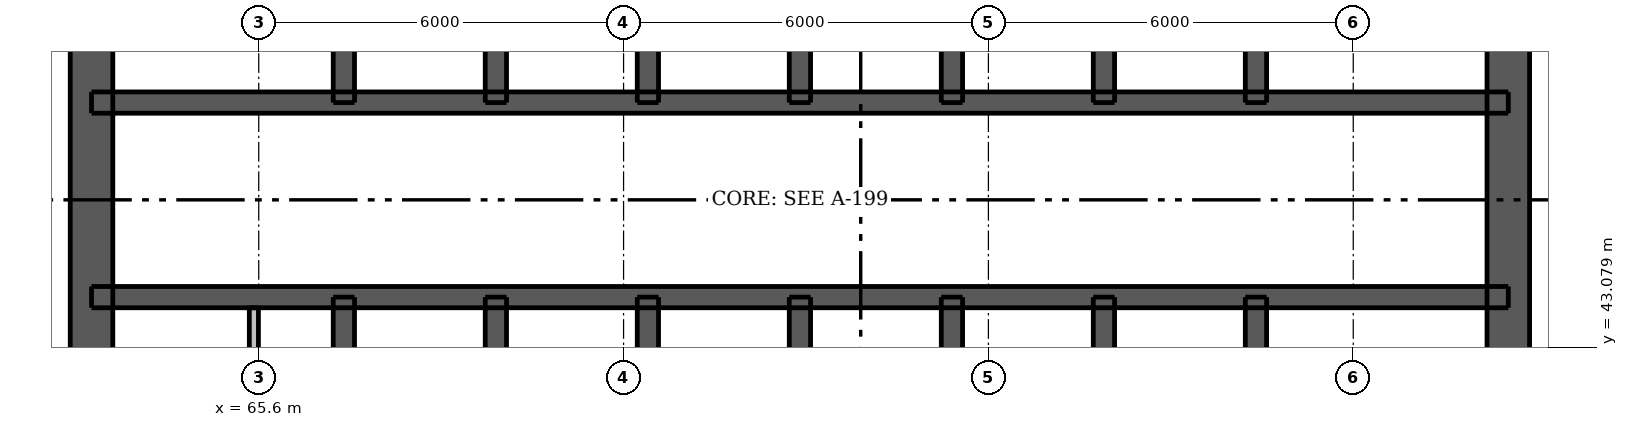
"""IFC4 building model, lengths in metres.
Left out: names, types, materials, properties, quantities, classifications, styles, units other than length and angle.
Written with IfcOpenShell. Run it as: python <this file> out.ifc"""

import sys

from ifc_helpers import new_model, si_unit, direction, frame, frame_2d, origin, place, context, subcontext, project, spatial, rectangle, extrude, element, fill, save


model = new_model("IFC4")
c1 = context("Model", 3, precision=1e-05, world=origin(), true_north=direction((0.0, 1.0)))
c2 = subcontext(c1, "Body", "Model", "MODEL_VIEW")
j1 = project(units=[si_unit("LENGTHUNIT", "METRE"), si_unit("PLANEANGLEUNIT", "RADIAN")], contexts=[c1])
p1 = place(None, origin())
s1 = spatial("IfcSite", under=j1, at=p1, CompositionType="ELEMENT")
p2 = place(p1, origin())
s2 = spatial("IfcBuilding", under=s1, at=p2, CompositionType="ELEMENT")
p3 = place(p2, frame((0.0, 0.0, 133.9)))
s3 = spatial("IfcBuildingStorey", under=s2, at=p3, CompositionType="ELEMENT", Elevation=133.9)
p4 = place(p3, frame((62.85, 33.5, 0.0), z_axis=(0.0, 0.0, 1.0), x_axis=(0.0, 1.0, 0.0)))
e1 = element("IfcWall", 1, at=p4, inside=s3, PredefinedType="SHEAR", context=c2, shape_type="SweptSolid", body=[
    extrude(rectangle(XDim=24.0, YDim=0.7, at=frame_2d((12.0, 0.0))), origin(), (0.0, 0.0, 1.0), 3.05),
])
p5 = place(p4, frame((11.2, 0.0, 0.0)))
e2 = element("IfcOpeningElement", 2, at=p5, cuts=e1, PredefinedType="OPENING", context=c2, shape_type="SweptSolid", body=[
    extrude(rectangle(XDim=1.6, YDim=2.1, at=frame_2d((0.8, 1.05))), frame((0.0, 0.36, 0.0), z_axis=(0.0, -1.0, 0.0), x_axis=(1.0, 0.0, 0.0)), (0.0, 0.0, 1.0), 0.72),
])
p6 = place(p3, frame((86.15, 33.5, 0.0), z_axis=(0.0, 0.0, 1.0), x_axis=(0.0, 1.0, 0.0)))
e3 = element("IfcWall", 3, at=p6, inside=s3, PredefinedType="SHEAR", context=c2, shape_type="SweptSolid", body=[
    extrude(rectangle(XDim=24.0, YDim=0.7, at=frame_2d((12.0, 0.0))), origin(), (0.0, 0.0, 1.0), 3.05),
])
p7 = place(p6, frame((11.2, 0.0, 0.0)))
e4 = element("IfcOpeningElement", 4, at=p7, cuts=e3, PredefinedType="OPENING", context=c2, shape_type="SweptSolid", body=[
    extrude(rectangle(XDim=1.6, YDim=2.1, at=frame_2d((0.8, 1.05))), frame((0.0, 0.36, 0.0), z_axis=(0.0, -1.0, 0.0), x_axis=(1.0, 0.0, 0.0)), (0.0, 0.0, 1.0), 0.72),
])
p8 = place(p3, frame((62.85, 43.9, 0.0), z_axis=(0.0, 0.0, 1.0), x_axis=(1.0, 0.0, 0.0)))
e5 = element("IfcWall", 5, at=p8, inside=s3, PredefinedType="SHEAR", context=c2, shape_type="SweptSolid", body=[
    extrude(rectangle(XDim=23.3, YDim=0.35, at=frame_2d((11.65, 0.0))), origin(), (0.0, 0.0, 1.0), 3.05),
])
p9 = place(p8, frame((1.06, 0.0, 0.0)))
e6 = element("IfcOpeningElement", 6, at=p9, cuts=e5, PredefinedType="OPENING", context=c2, shape_type="SweptSolid", body=[
    extrude(rectangle(XDim=0.9, YDim=2.1, at=frame_2d((0.45, 1.05))), frame((0.0, 0.185, 0.0), z_axis=(0.0, -1.0, 0.0), x_axis=(1.0, 0.0, 0.0)), (0.0, 0.0, 1.0), 0.37),
])
p10 = place(p8, frame((2.923, 0.0, 0.0)))
e7 = element("IfcOpeningElement", 7, at=p10, cuts=e5, PredefinedType="OPENING", context=c2, shape_type="SweptSolid", body=[
    extrude(rectangle(XDim=0.8, YDim=2.1, at=frame_2d((0.4, 1.05))), frame((0.0, 0.185, 0.0), z_axis=(0.0, -1.0, 0.0), x_axis=(1.0, 0.0, 0.0)), (0.0, 0.0, 1.0), 0.37),
])
p11 = place(p8, frame((20.688, 0.0, 0.0)))
e8 = element("IfcOpeningElement", 8, at=p11, cuts=e5, PredefinedType="OPENING", context=c2, shape_type="SweptSolid", body=[
    extrude(rectangle(XDim=0.9, YDim=2.1, at=frame_2d((0.45, 1.05))), frame((0.0, 0.185, 0.0), z_axis=(0.0, -1.0, 0.0), x_axis=(1.0, 0.0, 0.0)), (0.0, 0.0, 1.0), 0.37),
])
p12 = place(p8, frame((4.85, 0.0, 0.0)))
e9 = element("IfcOpeningElement", 9, at=p12, cuts=e5, PredefinedType="OPENING", context=c2, shape_type="SweptSolid", body=[
    extrude(rectangle(XDim=1.1, YDim=2.1, at=frame_2d((0.55, 1.05))), frame((0.0, 0.185, 0.0), z_axis=(0.0, -1.0, 0.0), x_axis=(1.0, 0.0, 0.0)), (0.0, 0.0, 1.0), 0.37),
])
p13 = place(p8, frame((7.35, 0.0, 0.0)))
e10 = element("IfcOpeningElement", 10, at=p13, cuts=e5, PredefinedType="OPENING", context=c2, shape_type="SweptSolid", body=[
    extrude(rectangle(XDim=1.1, YDim=2.1, at=frame_2d((0.55, 1.05))), frame((0.0, 0.185, 0.0), z_axis=(0.0, -1.0, 0.0), x_axis=(1.0, 0.0, 0.0)), (0.0, 0.0, 1.0), 0.37),
])
p14 = place(p8, frame((9.85, 0.0, 0.0)))
e11 = element("IfcOpeningElement", 11, at=p14, cuts=e5, PredefinedType="OPENING", context=c2, shape_type="SweptSolid", body=[
    extrude(rectangle(XDim=1.1, YDim=2.1, at=frame_2d((0.55, 1.05))), frame((0.0, 0.185, 0.0), z_axis=(0.0, -1.0, 0.0), x_axis=(1.0, 0.0, 0.0)), (0.0, 0.0, 1.0), 0.37),
])
p15 = place(p8, frame((12.35, 0.0, 0.0)))
e12 = element("IfcOpeningElement", 12, at=p15, cuts=e5, PredefinedType="OPENING", context=c2, shape_type="SweptSolid", body=[
    extrude(rectangle(XDim=1.1, YDim=2.1, at=frame_2d((0.55, 1.05))), frame((0.0, 0.185, 0.0), z_axis=(0.0, -1.0, 0.0), x_axis=(1.0, 0.0, 0.0)), (0.0, 0.0, 1.0), 0.37),
])
p16 = place(p8, frame((14.85, 0.0, 0.0)))
e13 = element("IfcOpeningElement", 13, at=p16, cuts=e5, PredefinedType="OPENING", context=c2, shape_type="SweptSolid", body=[
    extrude(rectangle(XDim=1.1, YDim=2.1, at=frame_2d((0.55, 1.05))), frame((0.0, 0.185, 0.0), z_axis=(0.0, -1.0, 0.0), x_axis=(1.0, 0.0, 0.0)), (0.0, 0.0, 1.0), 0.37),
])
p17 = place(p8, frame((17.35, 0.0, 0.0)))
e14 = element("IfcOpeningElement", 14, at=p17, cuts=e5, PredefinedType="OPENING", context=c2, shape_type="SweptSolid", body=[
    extrude(rectangle(XDim=1.1, YDim=2.1, at=frame_2d((0.55, 1.05))), frame((0.0, 0.185, 0.0), z_axis=(0.0, -1.0, 0.0), x_axis=(1.0, 0.0, 0.0)), (0.0, 0.0, 1.0), 0.37),
])
p18 = place(p3, frame((62.85, 47.1, 0.0), z_axis=(0.0, 0.0, 1.0), x_axis=(1.0, 0.0, 0.0)))
e15 = element("IfcWall", 15, at=p18, inside=s3, PredefinedType="SHEAR", context=c2, shape_type="SweptSolid", body=[
    extrude(rectangle(XDim=23.3, YDim=0.35, at=frame_2d((11.65, 0.0))), origin(), (0.0, 0.0, 1.0), 3.05),
])
p19 = place(p18, frame((1.712, 0.0, 0.0)))
e16 = element("IfcOpeningElement", 16, at=p19, cuts=e15, PredefinedType="OPENING", context=c2, shape_type="SweptSolid", body=[
    extrude(rectangle(XDim=0.9, YDim=2.1, at=frame_2d((0.45, 1.05))), frame((0.0, 0.185, 0.0), z_axis=(0.0, -1.0, 0.0), x_axis=(1.0, 0.0, 0.0)), (0.0, 0.0, 1.0), 0.37),
])
p20 = place(p18, frame((20.688, 0.0, 0.0)))
e17 = element("IfcOpeningElement", 17, at=p20, cuts=e15, PredefinedType="OPENING", context=c2, shape_type="SweptSolid", body=[
    extrude(rectangle(XDim=0.9, YDim=2.1, at=frame_2d((0.45, 1.05))), frame((0.0, 0.185, 0.0), z_axis=(0.0, -1.0, 0.0), x_axis=(1.0, 0.0, 0.0)), (0.0, 0.0, 1.0), 0.37),
])
p21 = place(p3, frame((67.0, 33.85, 0.0), z_axis=(0.0, 0.0, 1.0), x_axis=(0.0, 1.0, 0.0)))
e18 = element("IfcWall", 18, at=p21, inside=s3, PredefinedType="SHEAR", context=c2, shape_type="SweptSolid", body=[
    extrude(rectangle(XDim=10.05, YDim=0.35, at=frame_2d((5.025, 0.0))), origin(), (0.0, 0.0, 1.0), 3.05),
])
p22 = place(p21, frame((0.55, 0.0, 0.0)))
e19 = element("IfcOpeningElement", 19, at=p22, cuts=e18, PredefinedType="OPENING", context=c2, shape_type="SweptSolid", body=[
    extrude(rectangle(XDim=1.1, YDim=2.1, at=frame_2d((0.55, 1.05))), frame((0.0, 0.185, 0.0), z_axis=(0.0, -1.0, 0.0), x_axis=(1.0, 0.0, 0.0)), (0.0, 0.0, 1.0), 0.37),
])
for number, where, z_axis, x_axis in (
    (20, (67.0, 47.1, 0.0), (0.0, 0.0, 1.0), (0.0, 1.0, 0.0)),
    (21, (82.0, 33.85, 0.0), (0.0, 0.0, 1.0), (0.0, 1.0, 0.0)),
    (22, (82.0, 47.1, 0.0), (0.0, 0.0, 1.0), (0.0, 1.0, 0.0)),
):
    element("IfcWall", number, at=place(p3, frame(where, z_axis=z_axis, x_axis=x_axis)), inside=s3, PredefinedType="SHEAR", context=c2, shape_type="SweptSolid", body=[
        extrude(rectangle(XDim=10.05, YDim=0.35, at=frame_2d((5.025, 0.0))), origin(), (0.0, 0.0, 1.0), 3.05),
    ])
for number, where, z_axis, x_axis in (
    (23, (69.5, 41.0, 0.0), (0.0, 0.0, 1.0), (0.0, 1.0, 0.0)),
    (24, (69.5, 47.1, 0.0), (0.0, 0.0, 1.0), (0.0, 1.0, 0.0)),
    (25, (72.0, 41.0, 0.0), (0.0, 0.0, 1.0), (0.0, 1.0, 0.0)),
    (26, (72.0, 47.1, 0.0), (0.0, 0.0, 1.0), (0.0, 1.0, 0.0)),
    (27, (74.5, 41.0, 0.0), (0.0, 0.0, 1.0), (0.0, 1.0, 0.0)),
    (28, (74.5, 47.1, 0.0), (0.0, 0.0, 1.0), (0.0, 1.0, 0.0)),
    (29, (77.0, 41.0, 0.0), (0.0, 0.0, 1.0), (0.0, 1.0, 0.0)),
    (30, (77.0, 47.1, 0.0), (0.0, 0.0, 1.0), (0.0, 1.0, 0.0)),
    (31, (79.5, 41.0, 0.0), (0.0, 0.0, 1.0), (0.0, 1.0, 0.0)),
    (32, (79.5, 47.1, 0.0), (0.0, 0.0, 1.0), (0.0, 1.0, 0.0)),
):
    element("IfcWall", number, at=place(p3, frame(where, z_axis=z_axis, x_axis=x_axis)), inside=s3, PredefinedType="SHEAR", context=c2, shape_type="SweptSolid", body=[
        extrude(rectangle(XDim=2.9, YDim=0.35, at=frame_2d((1.45, 0.0))), origin(), (0.0, 0.0, 1.0), 3.05),
    ])
p23 = place(p3, frame((65.52, 41.175, 0.0), z_axis=(0.0, 0.0, 1.0), x_axis=(0.0, 1.0, 0.0)))
e33 = element("IfcWall", 33, at=p23, inside=s3, PredefinedType="PLUMBINGWALL", context=c2, shape_type="SweptSolid", body=[
    extrude(rectangle(XDim=2.55, YDim=0.15, at=frame_2d((1.275, 0.0))), origin(), (0.0, 0.0, 1.0), 3.05),
])
p24 = place(p5, origin())
e34 = element("IfcDoor", 34, at=p24, inside=s3, OperationType="DOUBLE_DOOR_SINGLE_SWING", PredefinedType="DOOR", context=c2, shape_type="SweptSolid", body=[
    extrude(rectangle(XDim=1.6, YDim=2.1, at=frame_2d((0.8, 1.05))), frame((0.0, -0.288, 0.0), z_axis=(0.0, -1.0, 0.0), x_axis=(1.0, 0.0, 0.0)), (0.0, 0.0, 1.0), 0.05),
])
fill(e2, e34)
p25 = place(p7, origin())
e35 = element("IfcDoor", 35, at=p25, inside=s3, OperationType="DOUBLE_DOOR_SINGLE_SWING", PredefinedType="DOOR", context=c2, shape_type="SweptSolid", body=[
    extrude(rectangle(XDim=1.6, YDim=2.1, at=frame_2d((0.8, 1.05))), frame((0.0, 0.337, 0.0), z_axis=(0.0, -1.0, 0.0), x_axis=(1.0, 0.0, 0.0)), (0.0, 0.0, 1.0), 0.05),
])
fill(e4, e35)
p26 = place(p9, origin())
e36 = element("IfcDoor", 36, at=p26, inside=s3, OperationType="SINGLE_SWING_LEFT", PredefinedType="DOOR", context=c2, shape_type="SweptSolid", body=[
    extrude(rectangle(XDim=0.9, YDim=2.1, at=frame_2d((0.45, 1.05))), frame((0.0, -0.112, 0.0), z_axis=(0.0, -1.0, 0.0), x_axis=(1.0, 0.0, 0.0)), (0.0, 0.0, 1.0), 0.05),
])
fill(e6, e36)
p27 = place(p10, origin())
e37 = element("IfcDoor", 37, at=p27, inside=s3, OperationType="SINGLE_SWING_RIGHT", PredefinedType="DOOR", context=c2, shape_type="SweptSolid", body=[
    extrude(rectangle(XDim=0.8, YDim=2.1, at=frame_2d((0.4, 1.05))), frame((0.0, -0.112, 0.0), z_axis=(0.0, -1.0, 0.0), x_axis=(1.0, 0.0, 0.0)), (0.0, 0.0, 1.0), 0.05),
])
fill(e7, e37)
p28 = place(p11, origin())
e38 = element("IfcDoor", 38, at=p28, inside=s3, OperationType="SINGLE_SWING_LEFT", PredefinedType="DOOR", context=c2, shape_type="SweptSolid", body=[
    extrude(rectangle(XDim=0.9, YDim=2.1, at=frame_2d((0.45, 1.05))), frame((0.0, -0.112, 0.0), z_axis=(0.0, -1.0, 0.0), x_axis=(1.0, 0.0, 0.0)), (0.0, 0.0, 1.0), 0.05),
])
fill(e8, e38)
p29 = place(p19, origin())
e39 = element("IfcDoor", 39, at=p29, inside=s3, OperationType="SINGLE_SWING_LEFT", PredefinedType="DOOR", context=c2, shape_type="SweptSolid", body=[
    extrude(rectangle(XDim=0.9, YDim=2.1, at=frame_2d((0.45, 1.05))), frame((0.0, 0.163, 0.0), z_axis=(0.0, -1.0, 0.0), x_axis=(1.0, 0.0, 0.0)), (0.0, 0.0, 1.0), 0.05),
])
fill(e16, e39)
p30 = place(p20, origin())
e40 = element("IfcDoor", 40, at=p30, inside=s3, OperationType="SINGLE_SWING_LEFT", PredefinedType="DOOR", context=c2, shape_type="SweptSolid", body=[
    extrude(rectangle(XDim=0.9, YDim=2.1, at=frame_2d((0.45, 1.05))), frame((0.0, 0.163, 0.0), z_axis=(0.0, -1.0, 0.0), x_axis=(1.0, 0.0, 0.0)), (0.0, 0.0, 1.0), 0.05),
])
fill(e17, e40)
p31 = place(p12, origin())
e41 = element("IfcDoor", 41, at=p31, inside=s3, OperationType="DOUBLE_DOOR_SLIDING", PredefinedType="DOOR", context=c2, shape_type="SweptSolid", body=[
    extrude(rectangle(XDim=1.1, YDim=2.1, at=frame_2d((0.55, 1.05))), frame((0.0, 0.025, 0.0), z_axis=(0.0, -1.0, 0.0), x_axis=(1.0, 0.0, 0.0)), (0.0, 0.0, 1.0), 0.05),
])
fill(e9, e41)
p32 = place(p13, origin())
e42 = element("IfcDoor", 42, at=p32, inside=s3, OperationType="DOUBLE_DOOR_SLIDING", PredefinedType="DOOR", context=c2, shape_type="SweptSolid", body=[
    extrude(rectangle(XDim=1.1, YDim=2.1, at=frame_2d((0.55, 1.05))), frame((0.0, 0.025, 0.0), z_axis=(0.0, -1.0, 0.0), x_axis=(1.0, 0.0, 0.0)), (0.0, 0.0, 1.0), 0.05),
])
fill(e10, e42)
p33 = place(p14, origin())
e43 = element("IfcDoor", 43, at=p33, inside=s3, OperationType="DOUBLE_DOOR_SLIDING", PredefinedType="DOOR", context=c2, shape_type="SweptSolid", body=[
    extrude(rectangle(XDim=1.1, YDim=2.1, at=frame_2d((0.55, 1.05))), frame((0.0, 0.025, 0.0), z_axis=(0.0, -1.0, 0.0), x_axis=(1.0, 0.0, 0.0)), (0.0, 0.0, 1.0), 0.05),
])
fill(e11, e43)
p34 = place(p15, origin())
e44 = element("IfcDoor", 44, at=p34, inside=s3, OperationType="DOUBLE_DOOR_SLIDING", PredefinedType="DOOR", context=c2, shape_type="SweptSolid", body=[
    extrude(rectangle(XDim=1.1, YDim=2.1, at=frame_2d((0.55, 1.05))), frame((0.0, 0.025, 0.0), z_axis=(0.0, -1.0, 0.0), x_axis=(1.0, 0.0, 0.0)), (0.0, 0.0, 1.0), 0.05),
])
fill(e12, e44)
p35 = place(p16, origin())
e45 = element("IfcDoor", 45, at=p35, inside=s3, OperationType="DOUBLE_DOOR_SLIDING", PredefinedType="DOOR", context=c2, shape_type="SweptSolid", body=[
    extrude(rectangle(XDim=1.1, YDim=2.1, at=frame_2d((0.55, 1.05))), frame((0.0, 0.025, 0.0), z_axis=(0.0, -1.0, 0.0), x_axis=(1.0, 0.0, 0.0)), (0.0, 0.0, 1.0), 0.05),
])
fill(e13, e45)
p36 = place(p17, origin())
e46 = element("IfcDoor", 46, at=p36, inside=s3, OperationType="DOUBLE_DOOR_SLIDING", PredefinedType="DOOR", context=c2, shape_type="SweptSolid", body=[
    extrude(rectangle(XDim=1.1, YDim=2.1, at=frame_2d((0.55, 1.05))), frame((0.0, 0.025, 0.0), z_axis=(0.0, -1.0, 0.0), x_axis=(1.0, 0.0, 0.0)), (0.0, 0.0, 1.0), 0.05),
])
fill(e14, e46)
save(model, sys.argv[1])
